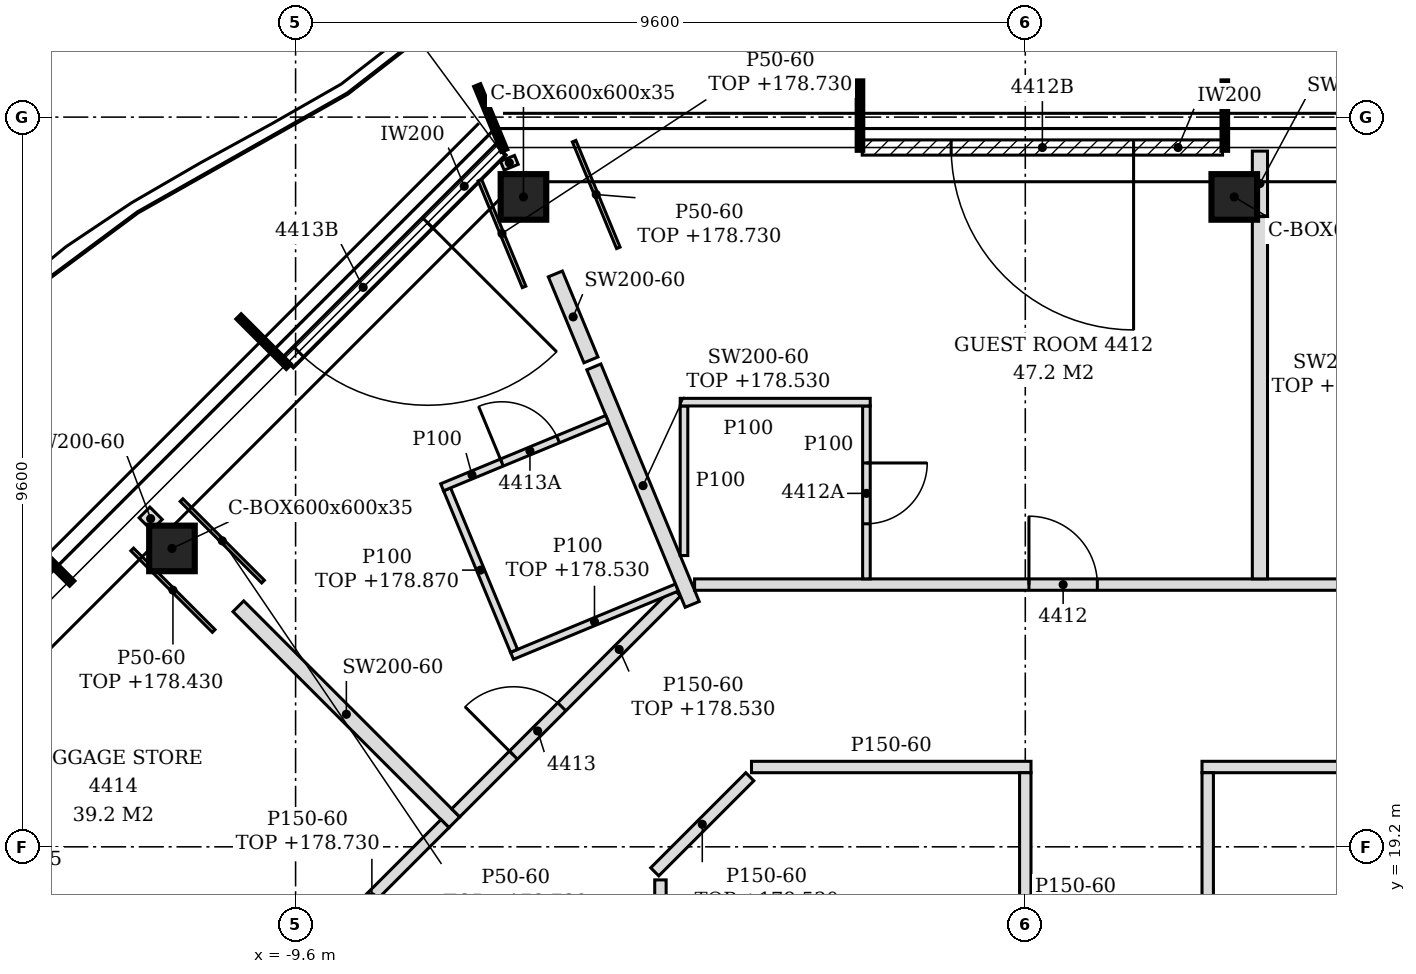
"""IFC4 building model, lengths in metres.
Left out: names, types, materials, properties, quantities, classifications, styles, units other than length and angle.
Written with IfcOpenShell. Run it as: python <this file> out.ifc"""

import sys

from ifc_helpers import new_model, si_unit, direction, frame, frame_2d, origin, origin_2d, place, context, subcontext, project, spatial, polyline, rectangle, hollow_rectangle, outline, extrude, clip, halfspace, element, fill, save


model = new_model("IFC4")
c1 = context("Model", 3, precision=1e-05, world=origin(), true_north=direction((0.0, 1.0)))
c2 = subcontext(c1, "Body", "Model", "MODEL_VIEW")
j1 = project(units=[si_unit("LENGTHUNIT", "METRE"), si_unit("PLANEANGLEUNIT", "RADIAN")], contexts=[c1])
p1 = place(None, origin())
s1 = spatial("IfcSite", under=j1, at=p1, CompositionType="ELEMENT")
p2 = place(p1, origin())
s2 = spatial("IfcBuilding", under=s1, at=p2, CompositionType="ELEMENT")
p3 = place(p2, frame((0.0, 0.0, 175.8)))
s3 = spatial("IfcBuildingStorey", under=s2, at=p3, CompositionType="ELEMENT", Elevation=175.8)
for number, where, z_axis, x_axis in (
    (1, (2.749, 27.75, -0.15), (0.183, -0.122, 0.976), (0.555, 0.832, 0.0)),
    (2, (-6.602, 27.75, -0.15), (0.183, -0.122, 0.976), (0.555, 0.832, 0.0)),
    (3, (-11.227, 23.126, -0.15), (0.183, -0.122, 0.976), (0.555, 0.832, 0.0)),
):
    element("IfcColumn", number, at=place(p3, frame(where, z_axis=z_axis, x_axis=x_axis)), inside=s3, PredefinedType="COLUMN", context=c2, shape_type="Clipping", body=[
        clip(clip(extrude(hollow_rectangle(XDim=0.6, YDim=0.6, WallThickness=0.035, at=origin_2d()), origin(), (0.0, 0.0, 1.0), 3.69), halfspace(frame((0.0, 0.0, 0.022), z_axis=(0.0, 0.0, 1.0), x_axis=(1.0, 0.0, 0.0)), True)), halfspace(frame((0.0, 0.0, 3.67), z_axis=(0.0, 0.0, 1.0), x_axis=(1.0, 0.0, 0.0)), False)),
    ])
p4 = place(p3, frame((2.595, 28.4, 0.0), z_axis=(0.0, 0.0, 1.0), x_axis=(-1.0, 0.0, 0.0)))
e4 = element("IfcWall", 4, at=p4, inside=s3, PredefinedType="NOTDEFINED", context=c2, shape_type="SweptSolid", body=[
    extrude(rectangle(XDim=4.74, YDim=0.2, at=frame_2d((2.37, 0.0))), origin(), (0.0, 0.0, 1.0), 3.45),
])
p5 = place(p4, frame((1.17, 0.0, 0.0)))
e5 = element("IfcOpeningElement", 5, at=p5, cuts=e4, PredefinedType="OPENING", context=c2, shape_type="SweptSolid", body=[
    extrude(rectangle(XDim=2.4, YDim=2.4, at=frame_2d((1.2, 1.2))), frame((0.0, 0.11, 0.0), z_axis=(0.0, -1.0, 0.0), x_axis=(1.0, 0.0, 0.0)), (0.0, 0.0, 1.0), 0.22),
])
p6 = place(p3, frame((-6.9, 28.372, 0.0), z_axis=(0.0, 0.0, 1.0), x_axis=(-0.707106781187, -0.707106781187, 0.0)))
e6 = element("IfcWall", 6, at=p6, inside=s3, PredefinedType="NOTDEFINED", context=c2, shape_type="SweptSolid", body=[
    extrude(rectangle(XDim=3.962, YDim=0.2, at=frame_2d((1.981, 0.0))), origin(), (0.0, 0.0, 1.0), 3.45),
])
p7 = place(p6, frame((1.362, 0.0, 0.0)))
e7 = element("IfcOpeningElement", 7, at=p7, cuts=e6, PredefinedType="OPENING", context=c2, shape_type="SweptSolid", body=[
    extrude(rectangle(XDim=2.4, YDim=2.4, at=frame_2d((1.2, 1.2))), frame((0.0, 0.11, 0.0), z_axis=(0.0, -1.0, 0.0), x_axis=(1.0, 0.0, 0.0)), (0.0, 0.0, 1.0), 0.22),
])
p8 = place(p3, frame((0.0, 13.275, 0.0), z_axis=(0.0, 0.0, 1.0), x_axis=(0.0, 1.0, 0.0)))
e8 = element("IfcWall", 8, at=p8, inside=s3, PredefinedType="PARTITIONING", context=c2, shape_type="SweptSolid", body=[
    extrude(outline(polyline([(0.0, 0.0), (6.9, 0.0), (6.9, 3.45), (5.43, 3.45), (5.428, 2.88), (5.22, 2.88), (5.218, 3.45), (0.075, 3.45), (0.073, 2.83), (0.0, 2.83), (0.0, 0.0)])), frame((0.0, 0.075, 0.0), z_axis=(0.0, -1.0, 0.0), x_axis=(1.0, 0.0, 0.0)), (0.0, 0.0, 1.0), 0.15),
])
p9 = place(p8, frame((3.0, 0.0, 0.0)))
e9 = element("IfcOpeningElement", 9, at=p9, cuts=e8, PredefinedType="OPENING", context=c2, shape_type="SweptSolid", body=[
    extrude(rectangle(XDim=0.9, YDim=2.1, at=frame_2d((0.45, 1.05))), frame((0.0, 0.085, 0.0), z_axis=(0.0, -1.0, 0.0), x_axis=(1.0, 0.0, 0.0)), (0.0, 0.0, 1.0), 0.17),
])
p10 = place(p3, frame((2.4, 13.275, 0.0), z_axis=(0.0, 0.0, 1.0), x_axis=(0.0, 1.0, 0.0)))
e10 = element("IfcWall", 10, at=p10, inside=s3, PredefinedType="PARTITIONING", context=c2, shape_type="SweptSolid", body=[
    extrude(outline(polyline([(0.0, 0.0), (6.9, 0.0), (6.9, 3.45), (5.43, 3.45), (5.428, 2.88), (5.22, 2.88), (5.218, 3.45), (0.075, 3.45), (0.073, 2.83), (0.0, 2.83), (0.0, 0.0)])), frame((0.0, 0.075, 0.0), z_axis=(0.0, -1.0, 0.0), x_axis=(1.0, 0.0, 0.0)), (0.0, 0.0, 1.0), 0.15),
])
p11 = place(p3, frame((-12.117, 15.022, 0.0), z_axis=(0.0, 0.0, 1.0), x_axis=(0.70701050414, 0.707203045127, 0.0)))
e11 = element("IfcWall", 11, at=p11, inside=s3, PredefinedType="PARTITIONING", context=c2, shape_type="SweptSolid", body=[
    extrude(rectangle(XDim=6.34, YDim=0.15, at=frame_2d((3.17, 0.0))), origin(), (0.0, 0.0, 1.0), 2.93),
])
p12 = place(p11, frame((2.72, 0.0, 0.0)))
e12 = element("IfcOpeningElement", 12, at=p12, cuts=e11, PredefinedType="OPENING", context=c2, shape_type="SweptSolid", body=[
    extrude(rectangle(XDim=0.9, YDim=2.1, at=frame_2d((0.45, 1.05))), frame((0.0, 0.085, 0.0), z_axis=(0.0, -1.0, 0.0), x_axis=(1.0, 0.0, 0.0)), (0.0, 0.0, 1.0), 0.17),
])
p13 = place(p3, frame((-4.8, 15.215, 0.0), z_axis=(0.0, 0.0, 1.0), x_axis=(0.0, 1.0, 0.0)))
e13 = element("IfcWall", 13, at=p13, inside=s3, PredefinedType="PARTITIONING", context=c2, shape_type="SweptSolid", body=[
    extrude(rectangle(XDim=3.55, YDim=0.15, at=frame_2d((1.775, 0.0))), origin(), (0.0, 0.0, 1.0), 2.73),
])
p14 = place(p3, frame((-4.875, 18.871, 0.0), z_axis=(0.0, 0.0, 1.0), x_axis=(0.707175784043, 0.707037771595, 0.0)))
e14 = element("IfcWall", 14, at=p14, inside=s3, PredefinedType="PARTITIONING", context=c2, shape_type="SweptSolid", body=[
    extrude(rectangle(XDim=1.769, YDim=0.15, at=frame_2d((0.885, 0.0))), origin(), (0.0, 0.0, 1.0), 2.73),
])
p15 = place(p3, frame((-7.511, 19.523, 0.0), z_axis=(0.0, 0.0, 1.0), x_axis=(-0.707167526582, 0.707046030572, 0.0)))
e15 = element("IfcWall", 15, at=p15, inside=s3, PredefinedType="PARTITIONING", context=c2, shape_type="SweptSolid", body=[
    extrude(rectangle(XDim=4.019, YDim=0.2, at=frame_2d((2.009, 0.0))), origin(), (0.0, 0.0, 1.0), 3.45),
])
p16 = place(p3, frame((-7.493, 19.647, 0.0), z_axis=(0.0, 0.0, 1.0), x_axis=(0.707136494677, 0.707077066448, 0.0)))
e16 = element("IfcWall", 16, at=p16, inside=s3, PredefinedType="PARTITIONING", context=c2, shape_type="SweptSolid", body=[
    extrude(rectangle(XDim=4.108, YDim=0.15, at=frame_2d((2.054, 0.0))), origin(), (0.0, 0.0, 1.0), 2.73),
])
p17 = place(p16, frame((1.074, 0.0, 0.0)))
e17 = element("IfcOpeningElement", 17, at=p17, cuts=e16, PredefinedType="OPENING", context=c2, shape_type="SweptSolid", body=[
    extrude(rectangle(XDim=0.9, YDim=2.1, at=frame_2d((0.45, 1.05))), frame((0.0, 0.085, 0.0), z_axis=(0.0, -1.0, 0.0), x_axis=(1.0, 0.0, 0.0)), (0.0, 0.0, 1.0), 0.17),
])
p18 = place(p3, frame((-3.602, 20.25, 0.0), z_axis=(0.0, 0.0, 1.0), x_axis=(1.0, 0.0, 0.0)))
e18 = element("IfcWall", 18, at=p18, inside=s3, PredefinedType="PARTITIONING", context=c2, shape_type="SweptSolid", body=[
    extrude(rectangle(XDim=3.677, YDim=0.15, at=frame_2d((1.838, 0.0))), origin(), (0.0, 0.0, 1.0), 3.45),
])
p19 = place(p3, frame((2.325, 20.25, 0.0), z_axis=(0.0, 0.0, 1.0), x_axis=(1.0, 0.0, 0.0)))
e19 = element("IfcWall", 19, at=p19, inside=s3, PredefinedType="PARTITIONING", context=c2, shape_type="SweptSolid", body=[
    extrude(outline(polyline([(0.0, 0.0), (16.127, 0.0), (16.127, 3.45), (5.025, 3.45), (5.023, 2.73), (4.725, 2.73), (4.723, 3.45), (0.0, 3.45), (0.0, 0.0)])), frame((0.0, 0.075, 0.0), z_axis=(0.0, -1.0, 0.0), x_axis=(1.0, 0.0, 0.0)), (0.0, 0.0, 1.0), 0.15),
])
p20 = place(p3, frame((-6.753, 21.713, 0.0), z_axis=(0.0, 0.0, 1.0), x_axis=(0.923907921622, 0.382614887798, 0.0)))
e20 = element("IfcWall", 20, at=p20, inside=s3, PredefinedType="PARTITIONING", context=c2, shape_type="SweptSolid", body=[
    extrude(rectangle(XDim=2.349, YDim=0.1, at=frame_2d((1.175, 0.0))), origin(), (0.0, 0.0, 1.0), 2.73),
])
p21 = place(p3, frame((-6.726, 21.778, 0.0), z_axis=(0.0, 0.0, 1.0), x_axis=(-0.382911179632, 0.923785163614, 0.0)))
e21 = element("IfcWall", 21, at=p21, inside=s3, PredefinedType="PARTITIONING", context=c2, shape_type="SweptSolid", body=[
    extrude(rectangle(XDim=2.3, YDim=0.1, at=frame_2d((1.15, 0.0))), origin(), (0.0, 0.0, 1.0), 3.07),
])
p22 = place(p3, frame((-4.382, 22.389, 0.0), z_axis=(0.0, 0.0, 1.0), x_axis=(-0.382553705703, 0.923933256384, 0.0)))
e22 = element("IfcWall", 22, at=p22, inside=s3, PredefinedType="PARTITIONING", context=c2, shape_type="SweptSolid", body=[
    extrude(rectangle(XDim=3.382, YDim=0.2, at=frame_2d((1.691, 0.0))), origin(), (0.0, 0.0, 1.0), 2.73),
])
p23 = place(p3, frame((-4.351, 22.65, 0.0), z_axis=(0.0, 0.0, 1.0), x_axis=(1.0, 0.0, 0.0)))
e23 = element("IfcWall", 23, at=p23, inside=s3, PredefinedType="PARTITIONING", context=c2, shape_type="SweptSolid", body=[
    extrude(outline(polyline([(0.0, 0.0), (23.551, 0.0), (23.552, 2.73), (23.401, 2.73), (23.399, 3.45), (11.701, 3.45), (11.699, 2.73), (11.401, 2.73), (11.399, 3.45), (0.0, 3.45), (0.0, 0.0)])), frame((0.0, 0.075, 0.0), z_axis=(0.0, -1.0, 0.0), x_axis=(1.0, 0.0, 0.0)), (0.0, 0.0, 1.0), 0.15),
])
p24 = place(p23, frame((20.99, 0.0, 0.0)))
e24 = element("IfcOpeningElement", 24, at=p24, cuts=e23, PredefinedType="OPENING", context=c2, shape_type="SweptSolid", body=[
    extrude(rectangle(XDim=0.9, YDim=2.1, at=frame_2d((0.45, 1.05))), frame((0.0, 0.085, 0.0), z_axis=(0.0, -1.0, 0.0), x_axis=(1.0, 0.0, 0.0)), (0.0, 0.0, 1.0), 0.17),
])
p25 = place(p23, frame((11.664, 0.0, 0.0)))
e25 = element("IfcOpeningElement", 25, at=p25, cuts=e23, PredefinedType="OPENING", context=c2, shape_type="SweptSolid", body=[
    extrude(rectangle(XDim=0.9, YDim=2.1, at=frame_2d((0.45, 1.05))), frame((0.0, 0.085, 0.0), z_axis=(0.0, -1.0, 0.0), x_axis=(1.0, 0.0, 0.0)), (0.0, 0.0, 1.0), 0.17),
])
p26 = place(p23, frame((4.399, 0.0, 0.0)))
e26 = element("IfcOpeningElement", 26, at=p26, cuts=e23, PredefinedType="OPENING", context=c2, shape_type="SweptSolid", body=[
    extrude(rectangle(XDim=0.9, YDim=2.1, at=frame_2d((0.45, 1.05))), frame((0.0, 0.085, 0.0), z_axis=(0.0, -1.0, 0.0), x_axis=(1.0, 0.0, 0.0)), (0.0, 0.0, 1.0), 0.17),
])
p27 = place(p3, frame((-2.09, 22.725, 0.0), z_axis=(0.0, 0.0, 1.0), x_axis=(0.0, 1.0, 0.0)))
e27 = element("IfcWall", 27, at=p27, inside=s3, PredefinedType="PARTITIONING", context=c2, shape_type="SweptSolid", body=[
    extrude(outline(polyline([(0.0, 0.0), (2.275, 0.0), (2.275, 3.45), (0.78, 3.45), (0.778, 2.88), (0.57, 2.88), (0.568, 3.45), (0.0, 3.45), (0.0, 0.0)])), frame((0.0, 0.05, 0.0), z_axis=(0.0, -1.0, 0.0), x_axis=(1.0, 0.0, 0.0)), (0.0, 0.0, 1.0), 0.1),
])
p28 = place(p27, frame((0.725, 0.0, 0.0)))
e28 = element("IfcOpeningElement", 28, at=p28, cuts=e27, PredefinedType="OPENING", context=c2, shape_type="SweptSolid", body=[
    extrude(rectangle(XDim=0.8, YDim=2.1, at=frame_2d((0.4, 1.05))), frame((0.0, 0.06, 0.0), z_axis=(0.0, -1.0, 0.0), x_axis=(1.0, 0.0, 0.0)), (0.0, 0.0, 1.0), 0.12),
])
p29 = place(p3, frame((3.087, 22.725, 0.0), z_axis=(0.0, 0.0, 1.0), x_axis=(0.0, 1.0, 0.0)))
e29 = element("IfcWall", 29, at=p29, inside=s3, PredefinedType="PARTITIONING", context=c2, shape_type="SweptSolid", body=[
    extrude(outline(polyline([(0.0, 0.0), (4.766, 0.0), (4.478, 0.863), (4.373, 1.725), (4.373, 2.587), (4.373, 2.88), (0.0, 2.88), (0.0, 2.587), (0.0, 1.725), (0.0, 0.863), (0.0, 0.0)])), frame((0.0, 0.1, 0.0), z_axis=(0.0, -1.0, 0.0), x_axis=(1.0, 0.0, 0.0)), (0.0, 0.0, 1.0), 0.2),
])
p30 = place(p3, frame((-4.49, 23.032, 0.0), z_axis=(0.0, 0.0, 1.0), x_axis=(0.0, 1.0, 0.0)))
e30 = element("IfcWall", 30, at=p30, inside=s3, PredefinedType="PARTITIONING", context=c2, shape_type="SweptSolid", body=[
    extrude(outline(polyline([(0.0, 0.0), (1.968, 0.0), (1.968, 3.45), (0.473, 3.45), (0.471, 2.88), (0.263, 2.88), (0.261, 3.45), (0.0, 3.45), (0.0, 0.0)])), frame((0.0, 0.05, 0.0), z_axis=(0.0, -1.0, 0.0), x_axis=(1.0, 0.0, 0.0)), (0.0, 0.0, 1.0), 0.1),
])
p31 = place(p3, frame((-11.425, 23.437, 0.0), z_axis=(0.0, 0.0, 1.0), x_axis=(-0.707637841256, 0.706575321974, 0.0)))
e31 = element("IfcWall", 31, at=p31, inside=s3, PredefinedType="PARTITIONING", context=c2, shape_type="SweptSolid", body=[
    extrude(rectangle(XDim=0.23, YDim=0.2, at=frame_2d((0.115, 0.0))), origin(), (0.0, 0.0, 1.0), 3.45),
])
p32 = place(p3, frame((-7.672, 23.93, 0.0), z_axis=(0.0, 0.0, 1.0), x_axis=(0.923968736757, 0.382468003231, 0.0)))
e32 = element("IfcWall", 32, at=p32, inside=s3, PredefinedType="PARTITIONING", context=c2, shape_type="SweptSolid", body=[
    extrude(rectangle(XDim=2.35, YDim=0.1, at=frame_2d((1.175, 0.0))), origin(), (0.0, 0.0, 1.0), 3.45),
])
p33 = place(p32, frame((0.851, 0.0, 0.0)))
e33 = element("IfcOpeningElement", 33, at=p33, cuts=e32, PredefinedType="OPENING", context=c2, shape_type="SweptSolid", body=[
    extrude(rectangle(XDim=0.8, YDim=2.1, at=frame_2d((0.4, 1.05))), frame((0.0, 0.06, 0.0), z_axis=(0.0, -1.0, 0.0), x_axis=(1.0, 0.0, 0.0)), (0.0, 0.0, 1.0), 0.12),
])
p34 = place(p3, frame((-4.54, 25.05, 0.0), z_axis=(0.0, 0.0, 1.0), x_axis=(1.0, 0.0, 0.0)))
e34 = element("IfcWall", 34, at=p34, inside=s3, PredefinedType="PARTITIONING", context=c2, shape_type="SweptSolid", body=[
    extrude(rectangle(XDim=2.5, YDim=0.1, at=frame_2d((1.25, 0.0))), origin(), (0.0, 0.0, 1.0), 3.45),
])
p35 = place(p3, frame((-5.714, 25.606, 0.0), z_axis=(0.0, 0.0, 1.0), x_axis=(-0.38281572922, 0.923824722261, 0.0)))
e35 = element("IfcWall", 35, at=p35, inside=s3, PredefinedType="PARTITIONING", context=c2, shape_type="SweptSolid", body=[
    extrude(rectangle(XDim=1.224, YDim=0.2, at=frame_2d((0.612, 0.0))), origin(), (0.0, 0.0, 1.0), 3.45),
])
p36 = place(p3, frame((3.087, 27.498, 0.0), z_axis=(0.0, 0.0, 1.0), x_axis=(0.0, 1.0, 0.0)))
e36 = element("IfcWall", 36, at=p36, inside=s3, PredefinedType="PARTITIONING", context=c2, shape_type="SweptSolid", body=[
    extrude(outline(polyline([(0.454, 0.0), (0.854, 0.0), (0.854, 0.863), (0.854, 1.725), (0.854, 2.587), (0.854, 3.45), (0.0, 3.45), (0.33, 2.587), (0.438, 1.725), (0.454, 0.863), (0.454, 0.0)])), frame((0.0, 0.1, 0.0), z_axis=(0.0, -1.0, 0.0), x_axis=(1.0, 0.0, 0.0)), (0.0, 0.0, 1.0), 0.2),
])
p37 = place(p3, frame((-6.764, 28.14, 0.0), z_axis=(0.0, 0.0, 1.0), x_axis=(-0.38297496935, 0.923758720041, 0.0)))
e37 = element("IfcWall", 37, at=p37, inside=s3, PredefinedType="PARTITIONING", context=c2, shape_type="SweptSolid", body=[
    extrude(rectangle(XDim=0.127, YDim=0.2, at=frame_2d((0.063, 0.0))), origin(), (0.0, 0.0, 1.0), 3.45),
])
p38 = place(p3, frame((-10.677, 22.04, 0.0), z_axis=(0.0, 0.0, 1.0), x_axis=(-0.707106781187, 0.707106781187, 0.0)))
e38 = element("IfcWall", 38, at=p38, inside=s3, PredefinedType="PARTITIONING", context=c2, shape_type="SweptSolid", body=[
    extrude(rectangle(XDim=1.516, YDim=0.05, at=frame_2d((0.758, 0.0))), origin(), (0.0, 0.0, 1.0), 2.63),
])
p39 = place(p3, frame((-10.028, 22.689, 0.0), z_axis=(0.0, 0.0, 1.0), x_axis=(-0.707187285174, 0.707026268033, 0.0)))
e39 = element("IfcWall", 39, at=p39, inside=s3, PredefinedType="PARTITIONING", context=c2, shape_type="SweptSolid", body=[
    extrude(rectangle(XDim=1.516, YDim=0.05, at=frame_2d((0.758, 0.0))), origin(), (0.0, 0.0, 1.0), 2.93),
])
for number, where, z_axis, x_axis in (
    (40, (-5.354, 27.08, 0.0), (0.0, 0.0, 1.0), (-0.383, 0.924, 0.0)),
    (41, (-6.594, 26.566, 0.0), (0.0, 0.0, 1.0), (-0.383, 0.924, 0.0)),
):
    element("IfcWall", number, at=place(p3, frame(where, z_axis=z_axis, x_axis=x_axis)), inside=s3, PredefinedType="PARTITIONING", context=c2, shape_type="SweptSolid", body=[
        extrude(rectangle(XDim=1.519, YDim=0.05, at=frame_2d((0.76, 0.0))), origin(), (0.0, 0.0, 1.0), 2.93),
    ])
p40 = place(p5, origin())
e42 = element("IfcDoor", 42, at=p40, inside=s3, OperationType="SINGLE_SWING_LEFT", PredefinedType="DOOR", context=c2, shape_type="SweptSolid", body=[
    extrude(rectangle(XDim=2.4, YDim=2.4, at=frame_2d((1.2, 1.2))), frame((0.0, 0.025, 0.0), z_axis=(0.0, -1.0, 0.0), x_axis=(1.0, 0.0, 0.0)), (0.0, 0.0, 1.0), 0.05),
])
fill(e5, e42)
p41 = place(p7, origin())
e43 = element("IfcDoor", 43, at=p41, inside=s3, OperationType="SINGLE_SWING_LEFT", PredefinedType="DOOR", context=c2, shape_type="SweptSolid", body=[
    extrude(rectangle(XDim=2.4, YDim=2.4, at=frame_2d((1.2, 1.2))), frame((0.0, 0.025, 0.0), z_axis=(0.0, -1.0, 0.0), x_axis=(1.0, 0.0, 0.0)), (0.0, 0.0, 1.0), 0.05),
])
fill(e7, e43)
p42 = place(p26, origin())
e44 = element("IfcDoor", 44, at=p42, inside=s3, OperationType="SINGLE_SWING_LEFT", PredefinedType="DOOR", context=c2, shape_type="SweptSolid", body=[
    extrude(rectangle(XDim=0.9, YDim=2.1, at=frame_2d((0.45, 1.05))), frame((0.0, 0.025, 0.0), z_axis=(0.0, -1.0, 0.0), x_axis=(1.0, 0.0, 0.0)), (0.0, 0.0, 1.0), 0.05),
])
fill(e26, e44)
p43 = place(p28, frame((0.8, 0.0, 0.0), z_axis=(0.0, 0.0, 1.0), x_axis=(-1.0, 0.0, 0.0)))
e45 = element("IfcDoor", 45, at=p43, inside=s3, OperationType="SINGLE_SWING_LEFT", PredefinedType="DOOR", context=c2, shape_type="SweptSolid", body=[
    extrude(rectangle(XDim=0.8, YDim=2.1, at=frame_2d((0.4, 1.05))), frame((0.0, 0.025, 0.0), z_axis=(0.0, -1.0, 0.0), x_axis=(1.0, 0.0, 0.0)), (0.0, 0.0, 1.0), 0.05),
])
fill(e28, e45)
p44 = place(p17, origin())
e46 = element("IfcDoor", 46, at=p44, inside=s3, OperationType="SINGLE_SWING_LEFT", PredefinedType="DOOR", context=c2, shape_type="SweptSolid", body=[
    extrude(rectangle(XDim=0.9, YDim=2.1, at=frame_2d((0.45, 1.05))), frame((0.0, 0.025, 0.0), z_axis=(0.0, -1.0, 0.0), x_axis=(1.0, 0.0, 0.0)), (0.0, 0.0, 1.0), 0.05),
])
fill(e17, e46)
p45 = place(p33, origin())
e47 = element("IfcDoor", 47, at=p45, inside=s3, OperationType="SINGLE_SWING_LEFT", PredefinedType="DOOR", context=c2, shape_type="SweptSolid", body=[
    extrude(rectangle(XDim=0.8, YDim=2.1, at=frame_2d((0.4, 1.05))), frame((0.0, 0.025, 0.0), z_axis=(0.0, -1.0, 0.0), x_axis=(1.0, 0.0, 0.0)), (0.0, 0.0, 1.0), 0.05),
])
fill(e33, e47)
save(model, sys.argv[1])
